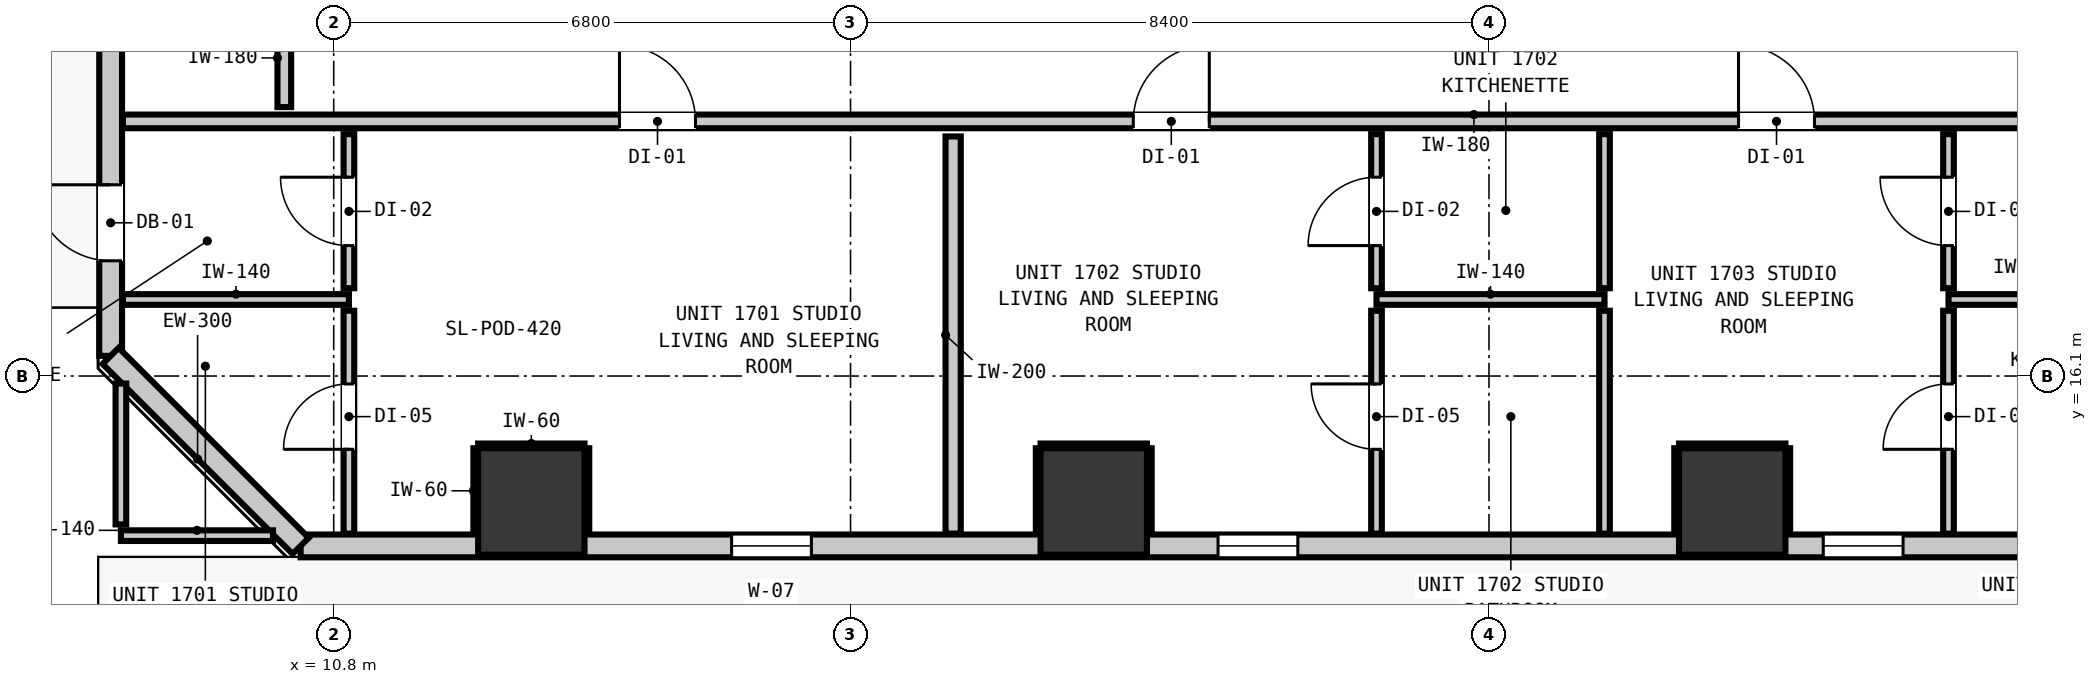
"""IFC4 building model, lengths in metres.
Left out: names, types, materials, properties, quantities, classifications, styles, units other than length and angle.
Written with IfcOpenShell. Run it as: python <this file> out.ifc"""

import sys

from ifc_helpers import new_model, si_unit, direction, frame, frame_2d, origin, origin_2d, place, context, subcontext, project, spatial, rectangle, extrude, element, fill, save


model = new_model("IFC4")
c1 = context("Model", 3, precision=1e-05, world=origin(), true_north=direction((0.0, 1.0)))
c2 = subcontext(c1, "Body", "Model", "MODEL_VIEW")
j1 = project(units=[si_unit("LENGTHUNIT", "METRE"), si_unit("PLANEANGLEUNIT", "RADIAN")], contexts=[c1])
p1 = place(None, origin())
s1 = spatial("IfcSite", under=j1, at=p1, CompositionType="ELEMENT")
p2 = place(p1, origin())
s2 = spatial("IfcBuilding", under=s1, at=p2, CompositionType="ELEMENT")
p3 = place(p2, frame((0.0, 0.0, 61.84)))
s3 = spatial("IfcBuildingStorey", under=s2, at=p3, CompositionType="ELEMENT", Elevation=61.84)
for number, where, z_axis, x_axis in (
    (1, (13.4, 14.45, -0.2), (0.0, 0.0, 1.0), (1.0, 0.0, 0.0)),
    (2, (20.8, 14.45, -0.2), (0.0, 0.0, 1.0), (1.0, 0.0, 0.0)),
    (3, (29.2, 14.45, -0.2), (0.0, 0.0, 1.0), (1.0, 0.0, 0.0)),
):
    element("IfcColumn", number, at=place(p3, frame(where, z_axis=z_axis, x_axis=x_axis)), inside=s3, PredefinedType="COLUMN", context=c2, shape_type="SweptSolid", body=[
        extrude(rectangle(XDim=1.4, YDim=1.4, at=origin_2d()), origin(), (0.0, 0.0, 1.0), 3.52),
    ])
p4 = place(p3, frame((7.865, 16.365, 0.0), z_axis=(0.0, 0.0, 1.0), x_axis=(0.0, 1.0, 0.0)))
e4 = element("IfcWall", 4, at=p4, inside=s3, PredefinedType="STANDARD", context=c2, shape_type="SweptSolid", body=[
    extrude(rectangle(XDim=34.67, YDim=0.3, at=frame_2d((17.335, 0.0))), origin(), (0.0, 0.0, 1.0), 3.06),
])
p5 = place(p4, frame((1.251, 0.0, 0.0)))
e5 = element("IfcOpeningElement", 5, at=p5, cuts=e4, PredefinedType="OPENING", context=c2, shape_type="SweptSolid", body=[
    extrude(rectangle(XDim=1.0, YDim=2.15, at=frame_2d((0.5, 1.075))), frame((0.0, 0.16, 0.0), z_axis=(0.0, -1.0, 0.0), x_axis=(1.0, 0.0, 0.0)), (0.0, 0.0, 1.0), 0.32),
])
p6 = place(p4, frame((32.733, 0.0, 0.85)))
e6 = element("IfcOpeningElement", 6, at=p6, cuts=e4, PredefinedType="OPENING", context=c2, shape_type="SweptSolid", body=[
    extrude(rectangle(XDim=1.05, YDim=1.65, at=frame_2d((0.525, 0.825))), frame((0.0, 0.16, 0.0), z_axis=(0.0, -1.0, 0.0), x_axis=(1.0, 0.0, 0.0)), (0.0, 0.0, 1.0), 0.32),
])
p7 = place(p3, frame((47.835, 13.865, 0.0), z_axis=(0.0, 0.0, 1.0), x_axis=(-1.0, 0.0, 0.0)))
e7 = element("IfcWall", 7, at=p7, inside=s3, PredefinedType="STANDARD", context=c2, shape_type="SweptSolid", body=[
    extrude(rectangle(XDim=37.47, YDim=0.3, at=frame_2d((18.735, 0.0))), origin(), (0.0, 0.0, 1.0), 3.06),
])
p8 = place(p7, frame((1.201, 0.0, 0.0)))
e8 = element("IfcOpeningElement", 8, at=p8, cuts=e7, PredefinedType="OPENING", context=c2, shape_type="SweptSolid", body=[
    extrude(rectangle(XDim=1.1, YDim=2.15, at=frame_2d((0.55, 1.075))), frame((0.0, 0.16, 0.0), z_axis=(0.0, -1.0, 0.0), x_axis=(1.0, 0.0, 0.0)), (0.0, 0.0, 1.0), 0.32),
])
p9 = place(p7, frame((30.75, 0.0, 0.85)))
e9 = element("IfcOpeningElement", 9, at=p9, cuts=e7, PredefinedType="OPENING", context=c2, shape_type="SweptSolid", body=[
    extrude(rectangle(XDim=1.05, YDim=1.65, at=frame_2d((0.525, 0.825))), frame((0.0, 0.16, 0.0), z_axis=(0.0, -1.0, 0.0), x_axis=(1.0, 0.0, 0.0)), (0.0, 0.0, 1.0), 0.32),
])
p10 = place(p7, frame((24.35, 0.0, 0.85)))
e10 = element("IfcOpeningElement", 10, at=p10, cuts=e7, PredefinedType="OPENING", context=c2, shape_type="SweptSolid", body=[
    extrude(rectangle(XDim=1.05, YDim=1.65, at=frame_2d((0.525, 0.825))), frame((0.0, 0.16, 0.0), z_axis=(0.0, -1.0, 0.0), x_axis=(1.0, 0.0, 0.0)), (0.0, 0.0, 1.0), 0.32),
])
p11 = place(p7, frame((16.387, 0.0, 0.85)))
e11 = element("IfcOpeningElement", 11, at=p11, cuts=e7, PredefinedType="OPENING", context=c2, shape_type="SweptSolid", body=[
    extrude(rectangle(XDim=1.05, YDim=1.65, at=frame_2d((0.525, 0.825))), frame((0.0, 0.16, 0.0), z_axis=(0.0, -1.0, 0.0), x_axis=(1.0, 0.0, 0.0)), (0.0, 0.0, 1.0), 0.32),
])
p12 = place(p7, frame((6.043, 0.0, 0.85)))
e12 = element("IfcOpeningElement", 12, at=p12, cuts=e7, PredefinedType="OPENING", context=c2, shape_type="SweptSolid", body=[
    extrude(rectangle(XDim=1.05, YDim=1.65, at=frame_2d((0.525, 0.825))), frame((0.0, 0.16, 0.0), z_axis=(0.0, -1.0, 0.0), x_axis=(1.0, 0.0, 0.0)), (0.0, 0.0, 1.0), 0.32),
])
p13 = place(p3, frame((10.365, 13.865, 0.0), z_axis=(0.0, 0.0, 1.0), x_axis=(-0.707106781187, 0.707106781187, 0.0)))
e13 = element("IfcWall", 13, at=p13, inside=s3, PredefinedType="STANDARD", context=c2, shape_type="SweptSolid", body=[
    extrude(rectangle(XDim=3.536, YDim=0.3, at=frame_2d((1.768, 0.0))), origin(), (0.0, 0.0, 1.0), 3.06),
])
p14 = place(p3, frame((8.027, 19.45, 0.0), z_axis=(0.0, 0.0, 1.0), x_axis=(1.0, 0.0, 0.0)))
e14 = element("IfcWall", 14, at=p14, inside=s3, PredefinedType="PARTITIONING", context=c2, shape_type="SweptSolid", body=[
    extrude(rectangle(XDim=28.902, YDim=0.18, at=frame_2d((14.451, 0.0))), origin(), (0.0, 0.0, 1.0), 3.06),
])
p15 = place(p14, frame((6.533, 0.0, 0.0)))
e15 = element("IfcOpeningElement", 15, at=p15, cuts=e14, PredefinedType="OPENING", context=c2, shape_type="SweptSolid", body=[
    extrude(rectangle(XDim=1.0, YDim=2.15, at=frame_2d((0.5, 1.075))), frame((0.0, 0.1, 0.0), z_axis=(0.0, -1.0, 0.0), x_axis=(1.0, 0.0, 0.0)), (0.0, 0.0, 1.0), 0.2),
])
p16 = place(p14, frame((13.293, 0.0, 0.0)))
e16 = element("IfcOpeningElement", 16, at=p16, cuts=e14, PredefinedType="OPENING", context=c2, shape_type="SweptSolid", body=[
    extrude(rectangle(XDim=1.0, YDim=2.15, at=frame_2d((0.5, 1.075))), frame((0.0, 0.1, 0.0), z_axis=(0.0, -1.0, 0.0), x_axis=(1.0, 0.0, 0.0)), (0.0, 0.0, 1.0), 0.2),
])
p17 = place(p14, frame((21.256, 0.0, 0.0)))
e17 = element("IfcOpeningElement", 17, at=p17, cuts=e14, PredefinedType="OPENING", context=c2, shape_type="SweptSolid", body=[
    extrude(rectangle(XDim=1.0, YDim=2.15, at=frame_2d((0.5, 1.075))), frame((0.0, 0.1, 0.0), z_axis=(0.0, -1.0, 0.0), x_axis=(1.0, 0.0, 0.0)), (0.0, 0.0, 1.0), 0.2),
])
p18 = place(p3, frame((8.0, 14.0, 0.0), z_axis=(0.0, 0.0, 1.0), x_axis=(1.0, 0.0, 0.0)))
e18 = element("IfcWall", 18, at=p18, inside=s3, PredefinedType="PARTITIONING", context=c2, shape_type="SweptSolid", body=[
    extrude(rectangle(XDim=2.001, YDim=0.14, at=frame_2d((1.0, 0.0))), origin(), (0.0, 0.0, 1.0), 3.06),
])
p19 = place(p3, frame((8.027, 17.107, 0.0), z_axis=(0.0, 0.0, 1.0), x_axis=(1.0, 0.0, 0.0)))
e19 = element("IfcWall", 19, at=p19, inside=s3, PredefinedType="PARTITIONING", context=c2, shape_type="SweptSolid", body=[
    extrude(rectangle(XDim=2.973, YDim=0.14, at=frame_2d((1.486, 0.0))), origin(), (0.0, 0.0, 1.0), 3.06),
])
p20 = place(p3, frame((24.52, 17.107, 0.0), z_axis=(0.0, 0.0, 1.0), x_axis=(1.0, 0.0, 0.0)))
e20 = element("IfcWall", 20, at=p20, inside=s3, PredefinedType="PARTITIONING", context=c2, shape_type="SweptSolid", body=[
    extrude(rectangle(XDim=3.0, YDim=0.14, at=frame_2d((1.5, 0.0))), origin(), (0.0, 0.0, 1.0), 3.06),
])
p21 = place(p3, frame((32.046, 17.107, 0.0), z_axis=(0.0, 0.0, 1.0), x_axis=(1.0, 0.0, 0.0)))
e21 = element("IfcWall", 21, at=p21, inside=s3, PredefinedType="PARTITIONING", context=c2, shape_type="SweptSolid", body=[
    extrude(rectangle(XDim=2.774, YDim=0.14, at=frame_2d((1.387, 0.0))), origin(), (0.0, 0.0, 1.0), 3.06),
])
p22 = place(p3, frame((18.95, 14.027, 0.0), z_axis=(0.0, 0.0, 1.0), x_axis=(0.0, 1.0, 0.0)))
e22 = element("IfcWall", 22, at=p22, inside=s3, PredefinedType="PARTITIONING", context=c2, shape_type="SweptSolid", body=[
    extrude(rectangle(XDim=5.225, YDim=0.2, at=frame_2d((2.612, 0.0))), origin(), (0.0, 0.0, 1.0), 3.06),
])
p23 = place(p3, frame((10.15, 19.638, 0.0), z_axis=(0.0, 0.0, 1.0), x_axis=(0.0, 1.0, 0.0)))
e23 = element("IfcWall", 23, at=p23, inside=s3, PredefinedType="PARTITIONING", context=c2, shape_type="SweptSolid", body=[
    extrude(rectangle(XDim=1.294, YDim=0.18, at=frame_2d((0.647, 0.0))), origin(), (0.0, 0.0, 1.0), 2.445),
])
p24 = place(p3, frame((8.0, 14.148, 0.0), z_axis=(0.0, 0.0, 1.0), x_axis=(0.0, 1.0, 0.0)))
e24 = element("IfcWall", 24, at=p24, inside=s3, PredefinedType="PARTITIONING", context=c2, shape_type="SweptSolid", body=[
    extrude(rectangle(XDim=1.853, YDim=0.14, at=frame_2d((0.927, 0.0))), origin(), (0.0, 0.0, 1.0), 3.06),
])
p25 = place(p3, frame((11.0, 14.027, 0.0), z_axis=(0.0, 0.0, 1.0), x_axis=(0.0, 1.0, 0.0)))
e25 = element("IfcWall", 25, at=p25, inside=s3, PredefinedType="PARTITIONING", context=c2, shape_type="SweptSolid", body=[
    extrude(rectangle(XDim=2.932, YDim=0.14, at=frame_2d((1.466, 0.0))), origin(), (0.0, 0.0, 1.0), 3.06),
])
p26 = place(p25, frame((1.109, 0.0, 0.0)))
e26 = element("IfcOpeningElement", 26, at=p26, cuts=e25, PredefinedType="OPENING", context=c2, shape_type="SweptSolid", body=[
    extrude(rectangle(XDim=0.86, YDim=2.02, at=frame_2d((0.43, 1.01))), frame((0.0, 0.08, 0.0), z_axis=(0.0, -1.0, 0.0), x_axis=(1.0, 0.0, 0.0)), (0.0, 0.0, 1.0), 0.16),
])
p27 = place(p3, frame((11.0, 17.255, 0.0), z_axis=(0.0, 0.0, 1.0), x_axis=(0.0, 1.0, 0.0)))
e27 = element("IfcWall", 27, at=p27, inside=s3, PredefinedType="PARTITIONING", context=c2, shape_type="SweptSolid", body=[
    extrude(rectangle(XDim=2.027, YDim=0.14, at=frame_2d((1.014, 0.0))), origin(), (0.0, 0.0, 1.0), 2.445),
])
p28 = place(p27, frame((0.561, 0.0, 0.0)))
e28 = element("IfcOpeningElement", 28, at=p28, cuts=e27, PredefinedType="OPENING", context=c2, shape_type="SweptSolid", body=[
    extrude(rectangle(XDim=0.9, YDim=2.1, at=frame_2d((0.45, 1.05))), frame((0.0, 0.08, 0.0), z_axis=(0.0, -1.0, 0.0), x_axis=(1.0, 0.0, 0.0)), (0.0, 0.0, 1.0), 0.16),
])
p29 = place(p3, frame((24.52, 14.027, 0.0), z_axis=(0.0, 0.0, 1.0), x_axis=(0.0, 1.0, 0.0)))
e29 = element("IfcWall", 29, at=p29, inside=s3, PredefinedType="PARTITIONING", context=c2, shape_type="SweptSolid", body=[
    extrude(rectangle(XDim=2.932, YDim=0.14, at=frame_2d((1.466, 0.0))), origin(), (0.0, 0.0, 1.0), 3.06),
])
p30 = place(p29, frame((1.109, 0.0, 0.0)))
e30 = element("IfcOpeningElement", 30, at=p30, cuts=e29, PredefinedType="OPENING", context=c2, shape_type="SweptSolid", body=[
    extrude(rectangle(XDim=0.86, YDim=2.02, at=frame_2d((0.43, 1.01))), frame((0.0, 0.08, 0.0), z_axis=(0.0, -1.0, 0.0), x_axis=(1.0, 0.0, 0.0)), (0.0, 0.0, 1.0), 0.16),
])
p31 = place(p3, frame((24.52, 17.255, 0.0), z_axis=(0.0, 0.0, 1.0), x_axis=(0.0, 1.0, 0.0)))
e31 = element("IfcWall", 31, at=p31, inside=s3, PredefinedType="PARTITIONING", context=c2, shape_type="SweptSolid", body=[
    extrude(rectangle(XDim=2.027, YDim=0.14, at=frame_2d((1.014, 0.0))), origin(), (0.0, 0.0, 1.0), 3.06),
])
p32 = place(p31, frame((0.561, 0.0, 0.0)))
e32 = element("IfcOpeningElement", 32, at=p32, cuts=e31, PredefinedType="OPENING", context=c2, shape_type="SweptSolid", body=[
    extrude(rectangle(XDim=0.9, YDim=2.1, at=frame_2d((0.45, 1.05))), frame((0.0, 0.08, 0.0), z_axis=(0.0, -1.0, 0.0), x_axis=(1.0, 0.0, 0.0)), (0.0, 0.0, 1.0), 0.16),
])
p33 = place(p3, frame((27.52, 14.027, 0.0), z_axis=(0.0, 0.0, 1.0), x_axis=(0.0, 1.0, 0.0)))
e33 = element("IfcWall", 33, at=p33, inside=s3, PredefinedType="PARTITIONING", context=c2, shape_type="SweptSolid", body=[
    extrude(rectangle(XDim=2.932, YDim=0.14, at=frame_2d((1.466, 0.0))), origin(), (0.0, 0.0, 1.0), 3.06),
])
p34 = place(p3, frame((27.52, 17.255, 0.0), z_axis=(0.0, 0.0, 1.0), x_axis=(0.0, 1.0, 0.0)))
e34 = element("IfcWall", 34, at=p34, inside=s3, PredefinedType="PARTITIONING", context=c2, shape_type="SweptSolid", body=[
    extrude(rectangle(XDim=2.027, YDim=0.14, at=frame_2d((1.014, 0.0))), origin(), (0.0, 0.0, 1.0), 3.06),
])
p35 = place(p3, frame((32.046, 14.027, 0.0), z_axis=(0.0, 0.0, 1.0), x_axis=(0.0, 1.0, 0.0)))
e35 = element("IfcWall", 35, at=p35, inside=s3, PredefinedType="PARTITIONING", context=c2, shape_type="SweptSolid", body=[
    extrude(rectangle(XDim=2.932, YDim=0.14, at=frame_2d((1.466, 0.0))), origin(), (0.0, 0.0, 1.0), 3.06),
])
p36 = place(p35, frame((1.109, 0.0, 0.0)))
e36 = element("IfcOpeningElement", 36, at=p36, cuts=e35, PredefinedType="OPENING", context=c2, shape_type="SweptSolid", body=[
    extrude(rectangle(XDim=0.86, YDim=2.02, at=frame_2d((0.43, 1.01))), frame((0.0, 0.08, 0.0), z_axis=(0.0, -1.0, 0.0), x_axis=(1.0, 0.0, 0.0)), (0.0, 0.0, 1.0), 0.16),
])
p37 = place(p3, frame((32.046, 17.255, 0.0), z_axis=(0.0, 0.0, 1.0), x_axis=(0.0, 1.0, 0.0)))
e37 = element("IfcWall", 37, at=p37, inside=s3, PredefinedType="PARTITIONING", context=c2, shape_type="SweptSolid", body=[
    extrude(rectangle(XDim=2.027, YDim=0.14, at=frame_2d((1.014, 0.0))), origin(), (0.0, 0.0, 1.0), 3.06),
])
p38 = place(p37, frame((0.561, 0.0, 0.0)))
e38 = element("IfcOpeningElement", 38, at=p38, cuts=e37, PredefinedType="OPENING", context=c2, shape_type="SweptSolid", body=[
    extrude(rectangle(XDim=0.9, YDim=2.1, at=frame_2d((0.45, 1.05))), frame((0.0, 0.08, 0.0), z_axis=(0.0, -1.0, 0.0), x_axis=(1.0, 0.0, 0.0)), (0.0, 0.0, 1.0), 0.16),
])
p39 = place(p3, frame((12.7, 15.182, 0.0), z_axis=(0.0, 0.0, 1.0), x_axis=(1.0, 0.0, 0.0)))
e39 = element("IfcWall", 39, at=p39, inside=s3, PredefinedType="PARTITIONING", context=c2, shape_type="SweptSolid", body=[
    extrude(rectangle(XDim=1.4, YDim=0.06, at=frame_2d((0.7, 0.0))), origin(), (0.0, 0.0, 1.0), 1.45),
])
for number, where, z_axis, x_axis in (
    (40, (12.668, 14.03, 0.0), (0.0, 0.0, 1.0), (0.0, 1.0, 0.0)),
    (41, (14.132, 14.03, 0.0), (0.0, 0.0, 1.0), (0.0, 1.0, 0.0)),
):
    element("IfcWall", number, at=place(p3, frame(where, z_axis=z_axis, x_axis=x_axis)), inside=s3, PredefinedType="PARTITIONING", context=c2, shape_type="SweptSolid", body=[
        extrude(rectangle(XDim=1.12, YDim=0.06, at=frame_2d((0.56, 0.0))), origin(), (0.0, 0.0, 1.0), 1.45),
    ])
p40 = place(p3, frame((20.1, 15.182, 0.0), z_axis=(0.0, 0.0, 1.0), x_axis=(1.0, 0.0, 0.0)))
e42 = element("IfcWall", 42, at=p40, inside=s3, PredefinedType="PARTITIONING", context=c2, shape_type="SweptSolid", body=[
    extrude(rectangle(XDim=1.4, YDim=0.06, at=frame_2d((0.7, 0.0))), origin(), (0.0, 0.0, 1.0), 1.45),
])
for number, where, z_axis, x_axis in (
    (43, (20.068, 14.03, 0.0), (0.0, 0.0, 1.0), (0.0, 1.0, 0.0)),
    (44, (21.532, 14.03, 0.0), (0.0, 0.0, 1.0), (0.0, 1.0, 0.0)),
):
    element("IfcWall", number, at=place(p3, frame(where, z_axis=z_axis, x_axis=x_axis)), inside=s3, PredefinedType="PARTITIONING", context=c2, shape_type="SweptSolid", body=[
        extrude(rectangle(XDim=1.12, YDim=0.06, at=frame_2d((0.56, 0.0))), origin(), (0.0, 0.0, 1.0), 1.45),
    ])
p41 = place(p3, frame((28.5, 15.182, 0.0), z_axis=(0.0, 0.0, 1.0), x_axis=(1.0, 0.0, 0.0)))
e45 = element("IfcWall", 45, at=p41, inside=s3, PredefinedType="PARTITIONING", context=c2, shape_type="SweptSolid", body=[
    extrude(rectangle(XDim=1.4, YDim=0.06, at=frame_2d((0.7, 0.0))), origin(), (0.0, 0.0, 1.0), 1.45),
])
for number, where, z_axis, x_axis in (
    (46, (28.468, 14.03, 0.0), (0.0, 0.0, 1.0), (0.0, 1.0, 0.0)),
    (47, (29.932, 14.03, 0.0), (0.0, 0.0, 1.0), (0.0, 1.0, 0.0)),
):
    element("IfcWall", number, at=place(p3, frame(where, z_axis=z_axis, x_axis=x_axis)), inside=s3, PredefinedType="PARTITIONING", context=c2, shape_type="SweptSolid", body=[
        extrude(rectangle(XDim=1.12, YDim=0.06, at=frame_2d((0.56, 0.0))), origin(), (0.0, 0.0, 1.0), 1.45),
    ])
p42 = place(p5, origin())
e48 = element("IfcDoor", 48, at=p42, inside=s3, OperationType="SINGLE_SWING_RIGHT", PredefinedType="DOOR", context=c2, shape_type="SweptSolid", body=[
    extrude(rectangle(XDim=1.0, YDim=2.15, at=frame_2d((0.5, 1.075))), frame((0.0, 0.025, 0.0), z_axis=(0.0, -1.0, 0.0), x_axis=(1.0, 0.0, 0.0)), (0.0, 0.0, 1.0), 0.05),
])
fill(e5, e48)
p43 = place(p9, origin())
e49 = element("IfcWindow", 49, at=p43, inside=s3, PartitioningType="SINGLE_PANEL", PredefinedType="WINDOW", context=c2, shape_type="SweptSolid", body=[
    extrude(rectangle(XDim=1.05, YDim=1.65, at=frame_2d((0.525, 0.825))), frame((0.0, 0.03, 0.0), z_axis=(0.0, -1.0, 0.0), x_axis=(1.0, 0.0, 0.0)), (0.0, 0.0, 1.0), 0.06),
])
fill(e9, e49)
p44 = place(p10, origin())
e50 = element("IfcWindow", 50, at=p44, inside=s3, PartitioningType="SINGLE_PANEL", PredefinedType="WINDOW", context=c2, shape_type="SweptSolid", body=[
    extrude(rectangle(XDim=1.05, YDim=1.65, at=frame_2d((0.525, 0.825))), frame((0.0, 0.03, 0.0), z_axis=(0.0, -1.0, 0.0), x_axis=(1.0, 0.0, 0.0)), (0.0, 0.0, 1.0), 0.06),
])
fill(e10, e50)
p45 = place(p11, origin())
e51 = element("IfcWindow", 51, at=p45, inside=s3, PartitioningType="SINGLE_PANEL", PredefinedType="WINDOW", context=c2, shape_type="SweptSolid", body=[
    extrude(rectangle(XDim=1.05, YDim=1.65, at=frame_2d((0.525, 0.825))), frame((0.0, 0.03, 0.0), z_axis=(0.0, -1.0, 0.0), x_axis=(1.0, 0.0, 0.0)), (0.0, 0.0, 1.0), 0.06),
])
fill(e11, e51)
p46 = place(p15, origin())
e52 = element("IfcDoor", 52, at=p46, inside=s3, OperationType="SINGLE_SWING_LEFT", PredefinedType="DOOR", context=c2, shape_type="SweptSolid", body=[
    extrude(rectangle(XDim=1.0, YDim=2.15, at=frame_2d((0.5, 1.075))), frame((0.0, 0.025, 0.0), z_axis=(0.0, -1.0, 0.0), x_axis=(1.0, 0.0, 0.0)), (0.0, 0.0, 1.0), 0.05),
])
fill(e15, e52)
p47 = place(p28, origin())
e53 = element("IfcDoor", 53, at=p47, inside=s3, OperationType="SINGLE_SWING_RIGHT", PredefinedType="DOOR", context=c2, shape_type="SweptSolid", body=[
    extrude(rectangle(XDim=0.9, YDim=2.1, at=frame_2d((0.45, 1.05))), frame((0.0, 0.025, 0.0), z_axis=(0.0, -1.0, 0.0), x_axis=(1.0, 0.0, 0.0)), (0.0, 0.0, 1.0), 0.05),
])
fill(e28, e53)
p48 = place(p26, origin())
e54 = element("IfcDoor", 54, at=p48, inside=s3, OperationType="SINGLE_SWING_LEFT", PredefinedType="DOOR", context=c2, shape_type="SweptSolid", body=[
    extrude(rectangle(XDim=0.86, YDim=2.02, at=frame_2d((0.43, 1.01))), frame((0.0, 0.025, 0.0), z_axis=(0.0, -1.0, 0.0), x_axis=(1.0, 0.0, 0.0)), (0.0, 0.0, 1.0), 0.05),
])
fill(e26, e54)
p49 = place(p16, origin())
e55 = element("IfcDoor", 55, at=p49, inside=s3, OperationType="SINGLE_SWING_RIGHT", PredefinedType="DOOR", context=c2, shape_type="SweptSolid", body=[
    extrude(rectangle(XDim=1.0, YDim=2.15, at=frame_2d((0.5, 1.075))), frame((0.0, 0.025, 0.0), z_axis=(0.0, -1.0, 0.0), x_axis=(1.0, 0.0, 0.0)), (0.0, 0.0, 1.0), 0.05),
])
fill(e16, e55)
p50 = place(p32, origin())
e56 = element("IfcDoor", 56, at=p50, inside=s3, OperationType="SINGLE_SWING_LEFT", PredefinedType="DOOR", context=c2, shape_type="SweptSolid", body=[
    extrude(rectangle(XDim=0.9, YDim=2.1, at=frame_2d((0.45, 1.05))), frame((0.0, 0.025, 0.0), z_axis=(0.0, -1.0, 0.0), x_axis=(1.0, 0.0, 0.0)), (0.0, 0.0, 1.0), 0.05),
])
fill(e32, e56)
p51 = place(p30, origin())
e57 = element("IfcDoor", 57, at=p51, inside=s3, OperationType="SINGLE_SWING_RIGHT", PredefinedType="DOOR", context=c2, shape_type="SweptSolid", body=[
    extrude(rectangle(XDim=0.86, YDim=2.02, at=frame_2d((0.43, 1.01))), frame((0.0, 0.025, 0.0), z_axis=(0.0, -1.0, 0.0), x_axis=(1.0, 0.0, 0.0)), (0.0, 0.0, 1.0), 0.05),
])
fill(e30, e57)
p52 = place(p17, origin())
e58 = element("IfcDoor", 58, at=p52, inside=s3, OperationType="SINGLE_SWING_LEFT", PredefinedType="DOOR", context=c2, shape_type="SweptSolid", body=[
    extrude(rectangle(XDim=1.0, YDim=2.15, at=frame_2d((0.5, 1.075))), frame((0.0, 0.025, 0.0), z_axis=(0.0, -1.0, 0.0), x_axis=(1.0, 0.0, 0.0)), (0.0, 0.0, 1.0), 0.05),
])
fill(e17, e58)
p53 = place(p38, origin())
e59 = element("IfcDoor", 59, at=p53, inside=s3, OperationType="SINGLE_SWING_RIGHT", PredefinedType="DOOR", context=c2, shape_type="SweptSolid", body=[
    extrude(rectangle(XDim=0.9, YDim=2.1, at=frame_2d((0.45, 1.05))), frame((0.0, 0.025, 0.0), z_axis=(0.0, -1.0, 0.0), x_axis=(1.0, 0.0, 0.0)), (0.0, 0.0, 1.0), 0.05),
])
fill(e38, e59)
p54 = place(p36, origin())
e60 = element("IfcDoor", 60, at=p54, inside=s3, OperationType="SINGLE_SWING_LEFT", PredefinedType="DOOR", context=c2, shape_type="SweptSolid", body=[
    extrude(rectangle(XDim=0.86, YDim=2.02, at=frame_2d((0.43, 1.01))), frame((0.0, 0.025, 0.0), z_axis=(0.0, -1.0, 0.0), x_axis=(1.0, 0.0, 0.0)), (0.0, 0.0, 1.0), 0.05),
])
fill(e36, e60)
save(model, sys.argv[1])
